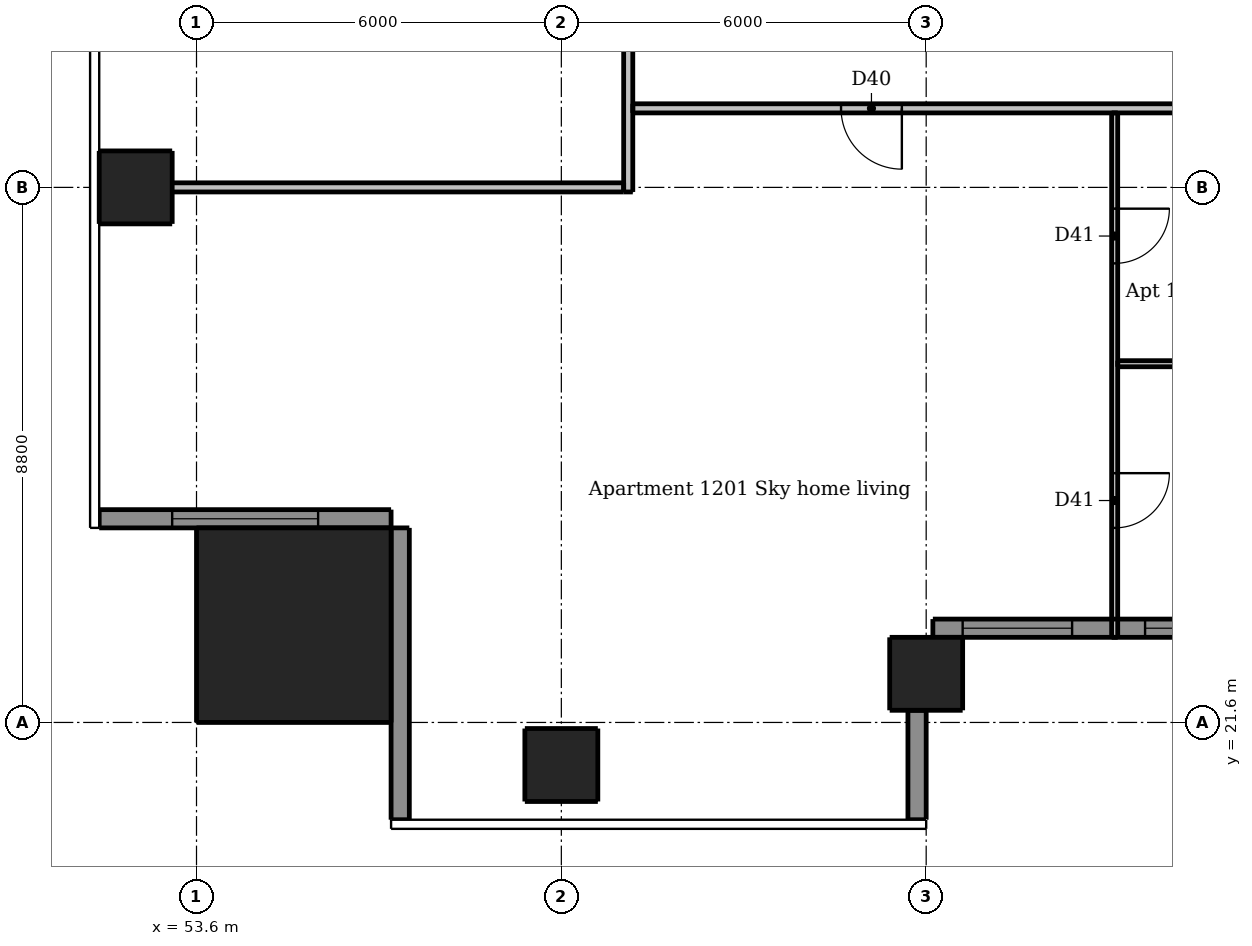
"""IFC4 building model, lengths in metres.
Left out: names, types, materials, properties, quantities, classifications, styles, units other than length and angle.
Written with IfcOpenShell. Run it as: python <this file> out.ifc"""

import sys

from ifc_helpers import new_model, si_unit, direction, frame, frame_2d, origin, origin_2d, place, context, subcontext, project, spatial, rectangle, extrude, element, fill, save


model = new_model("IFC4")
c1 = context("Model", 3, precision=1e-05, world=origin(), true_north=direction((0.0, 1.0)))
c2 = subcontext(c1, "Body", "Model", "MODEL_VIEW")
j1 = project(units=[si_unit("LENGTHUNIT", "METRE"), si_unit("PLANEANGLEUNIT", "RADIAN")], contexts=[c1])
p1 = place(None, origin())
s1 = spatial("IfcSite", under=j1, at=p1, CompositionType="ELEMENT")
p2 = place(p1, origin())
s2 = spatial("IfcBuilding", under=s1, at=p2, CompositionType="ELEMENT")
p3 = place(p2, frame((0.0, 0.0, 46.6)))
s3 = spatial("IfcBuildingStorey", under=s2, at=p3, CompositionType="ELEMENT", Elevation=46.6)
for number, where, z_axis, x_axis in (
    (1, (59.6, 20.9, 0.0), (0.0, 0.0, 1.0), (1.0, 0.0, 0.0)),
    (2, (65.6, 22.4, 0.0), (0.0, 0.0, 1.0), (1.0, 0.0, 0.0)),
    (3, (52.6, 30.4, 0.0), (0.0, 0.0, 1.0), (1.0, 0.0, 0.0)),
):
    element("IfcColumn", number, at=place(p3, frame(where, z_axis=z_axis, x_axis=x_axis)), inside=s3, PredefinedType="COLUMN", context=c2, shape_type="SweptSolid", body=[
        extrude(rectangle(XDim=1.2, YDim=1.2, at=origin_2d()), origin(), (0.0, 0.0, 1.0), 3.05),
    ])
p4 = place(p3, frame((55.2, 23.2, 0.0), z_axis=(0.0, 0.0, 1.0), x_axis=(1.0, 0.0, 0.0)))
e4 = element("IfcColumn", 4, at=p4, inside=s3, PredefinedType="COLUMN", context=c2, shape_type="SweptSolid", body=[
    extrude(rectangle(XDim=3.2, YDim=3.2, at=origin_2d()), origin(), (0.0, 0.0, 1.0), 3.3),
])
p5 = place(p3, frame((65.45, 20.0, 0.0), z_axis=(0.0, 0.0, 1.0), x_axis=(0.0, 1.0, 0.0)))
e5 = element("IfcWall", 5, at=p5, inside=s3, PredefinedType="SOLIDWALL", context=c2, shape_type="SweptSolid", body=[
    extrude(rectangle(XDim=1.8, YDim=0.3, at=frame_2d((0.9, 0.0))), origin(), (0.0, 0.0, 1.0), 3.05),
])
p6 = place(p3, frame((52.0, 24.95, 0.0), z_axis=(0.0, 0.0, 1.0), x_axis=(1.0, 0.0, 0.0)))
e6 = element("IfcWall", 6, at=p6, inside=s3, PredefinedType="SOLIDWALL", context=c2, shape_type="SweptSolid", body=[
    extrude(rectangle(XDim=4.8, YDim=0.3, at=frame_2d((2.4, 0.0))), origin(), (0.0, 0.0, 1.0), 3.05),
])
p7 = place(p6, frame((1.2, 0.0, 0.15)))
e7 = element("IfcOpeningElement", 7, at=p7, cuts=e6, PredefinedType="OPENING", context=c2, shape_type="SweptSolid", body=[
    extrude(rectangle(XDim=2.4, YDim=2.1, at=frame_2d((1.2, 1.05))), frame((0.0, 0.16, 0.0), z_axis=(0.0, -1.0, 0.0), x_axis=(1.0, 0.0, 0.0)), (0.0, 0.0, 1.0), 0.32),
])
p8 = place(p3, frame((56.95, 24.8, 0.0), z_axis=(0.0, 0.0, 1.0), x_axis=(0.0, -1.0, 0.0)))
e8 = element("IfcWall", 8, at=p8, inside=s3, PredefinedType="SOLIDWALL", context=c2, shape_type="SweptSolid", body=[
    extrude(rectangle(XDim=4.8, YDim=0.3, at=frame_2d((2.4, 0.0))), origin(), (0.0, 0.0, 1.0), 3.05),
])
p9 = place(p3, frame((65.71, 23.15, 0.0), z_axis=(0.0, 0.0, 1.0), x_axis=(1.0, 0.0, 0.0)))
e9 = element("IfcWall", 9, at=p9, inside=s3, PredefinedType="SOLIDWALL", context=c2, shape_type="SweptSolid", body=[
    extrude(rectangle(XDim=5.78, YDim=0.3, at=frame_2d((2.89, 0.0))), origin(), (0.0, 0.0, 1.0), 3.05),
])
p10 = place(p9, frame((0.49, 0.0, 0.15)))
e10 = element("IfcOpeningElement", 10, at=p10, cuts=e9, PredefinedType="OPENING", context=c2, shape_type="SweptSolid", body=[
    extrude(rectangle(XDim=1.8, YDim=2.1, at=frame_2d((0.9, 1.05))), frame((0.0, 0.16, 0.0), z_axis=(0.0, -1.0, 0.0), x_axis=(1.0, 0.0, 0.0)), (0.0, 0.0, 1.0), 0.32),
])
p11 = place(p9, frame((3.49, 0.0, 0.15)))
e11 = element("IfcOpeningElement", 11, at=p11, cuts=e9, PredefinedType="OPENING", context=c2, shape_type="SweptSolid", body=[
    extrude(rectangle(XDim=1.8, YDim=2.1, at=frame_2d((0.9, 1.05))), frame((0.0, 0.16, 0.0), z_axis=(0.0, -1.0, 0.0), x_axis=(1.0, 0.0, 0.0)), (0.0, 0.0, 1.0), 0.32),
])
p12 = place(p3, frame((68.7, 31.625, 0.0), z_axis=(0.0, 0.0, 1.0), x_axis=(0.0, -1.0, 0.0)))
e12 = element("IfcWall", 12, at=p12, inside=s3, PredefinedType="PARTITIONING", context=c2, shape_type="SweptSolid", body=[
    extrude(rectangle(XDim=8.625, YDim=0.1, at=frame_2d((4.312, 0.0))), origin(), (0.0, 0.0, 1.0), 3.05),
])
p13 = place(p12, frame((1.575, 0.0, 0.0)))
e13 = element("IfcOpeningElement", 13, at=p13, cuts=e12, PredefinedType="OPENING", context=c2, shape_type="SweptSolid", body=[
    extrude(rectangle(XDim=0.9, YDim=2.1, at=frame_2d((0.45, 1.05))), frame((0.0, 0.06, 0.0), z_axis=(0.0, -1.0, 0.0), x_axis=(1.0, 0.0, 0.0)), (0.0, 0.0, 1.0), 0.12),
])
p14 = place(p12, frame((5.925, 0.0, 0.0)))
e14 = element("IfcOpeningElement", 14, at=p14, cuts=e12, PredefinedType="OPENING", context=c2, shape_type="SweptSolid", body=[
    extrude(rectangle(XDim=0.9, YDim=2.1, at=frame_2d((0.45, 1.05))), frame((0.0, 0.06, 0.0), z_axis=(0.0, -1.0, 0.0), x_axis=(1.0, 0.0, 0.0)), (0.0, 0.0, 1.0), 0.12),
])
p15 = place(p3, frame((68.75, 27.5, 0.0), z_axis=(0.0, 0.0, 1.0), x_axis=(1.0, 0.0, 0.0)))
e15 = element("IfcWall", 15, at=p15, inside=s3, PredefinedType="PARTITIONING", context=c2, shape_type="SweptSolid", body=[
    extrude(rectangle(XDim=5.775, YDim=0.1, at=frame_2d((2.887, 0.0))), origin(), (0.0, 0.0, 1.0), 3.05),
])
p16 = place(p15, frame((3.7, 0.0, 0.0)))
e16 = element("IfcOpeningElement", 16, at=p16, cuts=e15, PredefinedType="OPENING", context=c2, shape_type="SweptSolid", body=[
    extrude(rectangle(XDim=0.8, YDim=2.1, at=frame_2d((0.4, 1.05))), frame((0.0, 0.06, 0.0), z_axis=(0.0, -1.0, 0.0), x_axis=(1.0, 0.0, 0.0)), (0.0, 0.0, 1.0), 0.12),
])
p17 = place(p3, frame((60.7, 30.325, 0.0), z_axis=(0.0, 0.0, 1.0), x_axis=(0.0, 1.0, 0.0)))
e17 = element("IfcWall", 17, at=p17, inside=s3, PredefinedType="PARTITIONING", context=c2, shape_type="SweptSolid", body=[
    extrude(rectangle(XDim=28.9, YDim=0.15, at=frame_2d((14.45, 0.0))), origin(), (0.0, 0.0, 1.0), 3.05),
])
p18 = place(p17, frame((7.375, 0.0, 0.0)))
e18 = element("IfcOpeningElement", 18, at=p18, cuts=e17, PredefinedType="OPENING", context=c2, shape_type="SweptSolid", body=[
    extrude(rectangle(XDim=1.0, YDim=2.1, at=frame_2d((0.5, 1.05))), frame((0.0, 0.085, 0.0), z_axis=(0.0, -1.0, 0.0), x_axis=(1.0, 0.0, 0.0)), (0.0, 0.0, 1.0), 0.17),
])
p19 = place(p17, frame((26.025, 0.0, 0.0)))
e19 = element("IfcOpeningElement", 19, at=p19, cuts=e17, PredefinedType="OPENING", context=c2, shape_type="SweptSolid", body=[
    extrude(rectangle(XDim=1.0, YDim=2.1, at=frame_2d((0.5, 1.05))), frame((0.0, 0.085, 0.0), z_axis=(0.0, -1.0, 0.0), x_axis=(1.0, 0.0, 0.0)), (0.0, 0.0, 1.0), 0.17),
])
p20 = place(p3, frame((89.525, 31.7, 0.0), z_axis=(0.0, 0.0, 1.0), x_axis=(-1.0, 0.0, 0.0)))
e20 = element("IfcWall", 20, at=p20, inside=s3, PredefinedType="PARTITIONING", context=c2, shape_type="SweptSolid", body=[
    extrude(rectangle(XDim=28.75, YDim=0.15, at=frame_2d((14.375, 0.0))), origin(), (0.0, 0.0, 1.0), 3.05),
])
p21 = place(p20, frame((24.325, 0.0, 0.0)))
e21 = element("IfcOpeningElement", 21, at=p21, cuts=e20, PredefinedType="OPENING", context=c2, shape_type="SweptSolid", body=[
    extrude(rectangle(XDim=1.0, YDim=2.1, at=frame_2d((0.5, 1.05))), frame((0.0, 0.085, 0.0), z_axis=(0.0, -1.0, 0.0), x_axis=(1.0, 0.0, 0.0)), (0.0, 0.0, 1.0), 0.17),
])
p22 = place(p20, frame((6.575, 0.0, 0.0)))
e22 = element("IfcOpeningElement", 22, at=p22, cuts=e20, PredefinedType="OPENING", context=c2, shape_type="SweptSolid", body=[
    extrude(rectangle(XDim=1.0, YDim=2.1, at=frame_2d((0.5, 1.05))), frame((0.0, 0.085, 0.0), z_axis=(0.0, -1.0, 0.0), x_axis=(1.0, 0.0, 0.0)), (0.0, 0.0, 1.0), 0.17),
])
p23 = place(p3, frame((52.0, 30.4, 0.0), z_axis=(0.0, 0.0, 1.0), x_axis=(1.0, 0.0, 0.0)))
e23 = element("IfcWall", 23, at=p23, inside=s3, PredefinedType="PARTITIONING", context=c2, shape_type="SweptSolid", body=[
    extrude(rectangle(XDim=8.625, YDim=0.15, at=frame_2d((4.312, 0.0))), origin(), (0.0, 0.0, 1.0), 2.647),
])
p24 = place(p7, origin())
e24 = element("IfcWindow", 24, at=p24, inside=s3, PartitioningType="DOUBLE_PANEL_VERTICAL", PredefinedType="WINDOW", context=c2, shape_type="SweptSolid", body=[
    extrude(rectangle(XDim=2.4, YDim=2.1, at=frame_2d((1.2, 1.05))), frame((0.0, 0.03, 0.0), z_axis=(0.0, -1.0, 0.0), x_axis=(1.0, 0.0, 0.0)), (0.0, 0.0, 1.0), 0.06),
])
fill(e7, e24)
p25 = place(p10, origin())
e25 = element("IfcWindow", 25, at=p25, inside=s3, PartitioningType="DOUBLE_PANEL_VERTICAL", PredefinedType="WINDOW", context=c2, shape_type="SweptSolid", body=[
    extrude(rectangle(XDim=1.8, YDim=2.1, at=frame_2d((0.9, 1.05))), frame((0.0, 0.03, 0.0), z_axis=(0.0, -1.0, 0.0), x_axis=(1.0, 0.0, 0.0)), (0.0, 0.0, 1.0), 0.06),
])
fill(e10, e25)
p26 = place(p11, origin())
e26 = element("IfcWindow", 26, at=p26, inside=s3, PartitioningType="DOUBLE_PANEL_VERTICAL", PredefinedType="WINDOW", context=c2, shape_type="SweptSolid", body=[
    extrude(rectangle(XDim=1.8, YDim=2.1, at=frame_2d((0.9, 1.05))), frame((0.0, 0.03, 0.0), z_axis=(0.0, -1.0, 0.0), x_axis=(1.0, 0.0, 0.0)), (0.0, 0.0, 1.0), 0.06),
])
fill(e11, e26)
p27 = place(p21, origin())
e27 = element("IfcDoor", 27, at=p27, inside=s3, OperationType="SINGLE_SWING_LEFT", PredefinedType="DOOR", context=c2, shape_type="SweptSolid", body=[
    extrude(rectangle(XDim=1.0, YDim=2.1, at=frame_2d((0.5, 1.05))), frame((0.0, 0.025, 0.0), z_axis=(0.0, -1.0, 0.0), x_axis=(1.0, 0.0, 0.0)), (0.0, 0.0, 1.0), 0.05),
])
fill(e21, e27)
p28 = place(p13, origin())
e28 = element("IfcDoor", 28, at=p28, inside=s3, OperationType="SINGLE_SWING_LEFT", PredefinedType="DOOR", context=c2, shape_type="SweptSolid", body=[
    extrude(rectangle(XDim=0.9, YDim=2.1, at=frame_2d((0.45, 1.05))), frame((0.0, 0.025, 0.0), z_axis=(0.0, -1.0, 0.0), x_axis=(1.0, 0.0, 0.0)), (0.0, 0.0, 1.0), 0.05),
])
fill(e13, e28)
p29 = place(p14, origin())
e29 = element("IfcDoor", 29, at=p29, inside=s3, OperationType="SINGLE_SWING_LEFT", PredefinedType="DOOR", context=c2, shape_type="SweptSolid", body=[
    extrude(rectangle(XDim=0.9, YDim=2.1, at=frame_2d((0.45, 1.05))), frame((0.0, 0.025, 0.0), z_axis=(0.0, -1.0, 0.0), x_axis=(1.0, 0.0, 0.0)), (0.0, 0.0, 1.0), 0.05),
])
fill(e14, e29)
save(model, sys.argv[1])
